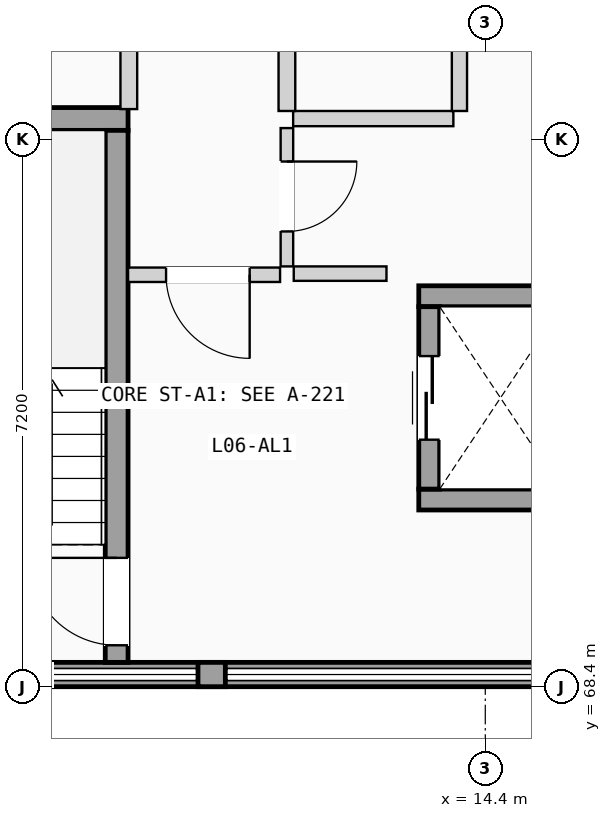
"""IFC4 building model, lengths in metres.
Left out: names, types, materials, properties, quantities, classifications, styles, units other than length and angle.
Written with IfcOpenShell. Run it as: python <this file> out.ifc"""

import sys

from ifc_helpers import new_model, si_unit, direction, frame, frame_2d, origin, place, context, subcontext, project, spatial, rectangle, extrude, element, fill, save


model = new_model("IFC4")
c1 = context("Model", 3, precision=1e-05, world=origin(), true_north=direction((0.0, 1.0)))
c2 = subcontext(c1, "Body", "Model", "MODEL_VIEW")
j1 = project(units=[si_unit("LENGTHUNIT", "METRE"), si_unit("PLANEANGLEUNIT", "RADIAN")], contexts=[c1])
p1 = place(None, origin())
s1 = spatial("IfcSite", under=j1, at=p1, CompositionType="ELEMENT")
p2 = place(p1, origin())
s2 = spatial("IfcBuilding", under=s1, at=p2, CompositionType="ELEMENT")
p3 = place(p2, frame((0.0, 0.0, 21.525)))
s3 = spatial("IfcBuildingStorey", under=s2, at=p3, CompositionType="ELEMENT", Elevation=21.525)
p4 = place(p3, frame((0.0, 68.56, 0.0), z_axis=(0.0, 0.0, 1.0), x_axis=(1.0, 0.0, 0.0)))
e1 = element("IfcWall", 1, at=p4, inside=s3, PredefinedType="SOLIDWALL", context=c2, shape_type="SweptSolid", body=[
    extrude(rectangle(XDim=21.6, YDim=0.32, at=frame_2d((10.8, 0.0))), origin(), (0.0, 0.0, 1.0), 1.11),
])
p5 = place(p3, frame((10.62, 68.56, 1.11), z_axis=(0.0, 0.0, 1.0), x_axis=(1.0, 0.0, 0.0)))
e2 = element("IfcWall", 2, at=p5, inside=s3, PredefinedType="SOLIDWALL", context=c2, shape_type="SweptSolid", body=[
    extrude(rectangle(XDim=0.36, YDim=0.32, at=frame_2d((0.18, 0.0))), origin(), (0.0, 0.0, 1.0), 1.78),
])
p6 = place(p3, frame((5.7, 75.87, 0.0), z_axis=(0.0, 0.0, 1.0), x_axis=(1.0, 0.0, 0.0)))
e3 = element("IfcWall", 3, at=p6, inside=s3, PredefinedType="SHEAR", context=c2, shape_type="SweptSolid", body=[
    extrude(rectangle(XDim=4.0, YDim=0.3, at=frame_2d((2.0, 0.0))), origin(), (0.0, 0.0, 1.0), 2.89),
])
p7 = place(p3, frame((9.55, 68.72, 0.0), z_axis=(0.0, 0.0, 1.0), x_axis=(0.0, 1.0, 0.0)))
e4 = element("IfcWall", 4, at=p7, inside=s3, PredefinedType="SHEAR", context=c2, shape_type="SweptSolid", body=[
    extrude(rectangle(XDim=7.0, YDim=0.3, at=frame_2d((3.5, 0.0))), origin(), (0.0, 0.0, 1.0), 2.89),
])
p8 = place(p7, frame((0.225, 0.0, 0.0)))
e5 = element("IfcOpeningElement", 5, at=p8, cuts=e4, PredefinedType="OPENING", context=c2, shape_type="SweptSolid", body=[
    extrude(rectangle(XDim=1.15, YDim=2.12, at=frame_2d((0.575, 1.06))), frame((0.0, 0.16, 0.0), z_axis=(0.0, -1.0, 0.0), x_axis=(1.0, 0.0, 0.0)), (0.0, 0.0, 1.0), 0.32),
])
for number, where, z_axis, x_axis in (
    (6, (13.525, 70.863, 0.0), (0.0, 0.0, 1.0), (1.0, 0.0, 0.0)),
    (7, (13.525, 73.538, 0.0), (0.0, 0.0, 1.0), (1.0, 0.0, 0.0)),
):
    element("IfcWall", number, at=place(p3, frame(where, z_axis=z_axis, x_axis=x_axis)), inside=s3, PredefinedType="SHEAR", context=c2, shape_type="SweptSolid", body=[
        extrude(rectangle(XDim=2.15, YDim=0.275, at=frame_2d((1.075, 0.0))), origin(), (0.0, 0.0, 1.0), 2.89),
    ])
p9 = place(p3, frame((13.663, 71.0, 0.0), z_axis=(0.0, 0.0, 1.0), x_axis=(0.0, 1.0, 0.0)))
e8 = element("IfcWall", 8, at=p9, inside=s3, PredefinedType="SHEAR", context=c2, shape_type="SweptSolid", body=[
    extrude(rectangle(XDim=2.4, YDim=0.275, at=frame_2d((1.2, 0.0))), origin(), (0.0, 0.0, 1.0), 2.89),
])
p10 = place(p9, frame((0.65, 0.0, 0.0)))
e9 = element("IfcOpeningElement", 9, at=p10, cuts=e8, PredefinedType="OPENING", context=c2, shape_type="SweptSolid", body=[
    extrude(rectangle(XDim=1.1, YDim=2.15, at=frame_2d((0.55, 1.075))), frame((0.0, 0.147, 0.0), z_axis=(0.0, -1.0, 0.0), x_axis=(1.0, 0.0, 0.0)), (0.0, 0.0, 1.0), 0.295),
])
p11 = place(p3, frame((11.88, 73.835, 0.0), z_axis=(0.0, 0.0, 1.0), x_axis=(1.0, 0.0, 0.0)))
e10 = element("IfcWall", 10, at=p11, inside=s3, PredefinedType="PARTITIONING", context=c2, shape_type="SweptSolid", body=[
    extrude(rectangle(XDim=1.22, YDim=0.19, at=frame_2d((0.61, 0.0))), origin(), (0.0, 0.0, 1.0), 2.87),
])
p12 = place(p3, frame((9.7, 73.82, 0.0), z_axis=(0.0, 0.0, 1.0), x_axis=(1.0, 0.0, 0.0)))
e11 = element("IfcWall", 11, at=p12, inside=s3, PredefinedType="PARTITIONING", context=c2, shape_type="SweptSolid", body=[
    extrude(rectangle(XDim=2.0, YDim=0.19, at=frame_2d((1.0, 0.0))), origin(), (0.0, 0.0, 1.0), 2.87),
])
p13 = place(p12, frame((0.5, 0.0, 0.0)))
e12 = element("IfcOpeningElement", 12, at=p13, cuts=e11, PredefinedType="OPENING", context=c2, shape_type="SweptSolid", body=[
    extrude(rectangle(XDim=1.1, YDim=2.12, at=frame_2d((0.55, 1.06))), frame((0.0, 0.105, 0.0), z_axis=(0.0, -1.0, 0.0), x_axis=(1.0, 0.0, 0.0)), (0.0, 0.0, 1.0), 0.21),
])
p14 = place(p3, frame((11.79, 73.93, 0.0), z_axis=(0.0, 0.0, 1.0), x_axis=(0.0, 1.0, 0.0)))
e13 = element("IfcWall", 13, at=p14, inside=s3, PredefinedType="PARTITIONING", context=c2, shape_type="SweptSolid", body=[
    extrude(rectangle(XDim=1.82, YDim=0.165, at=frame_2d((0.91, 0.0))), origin(), (0.0, 0.0, 1.0), 2.87),
])
p15 = place(p14, frame((0.46, 0.0, 0.0)))
e14 = element("IfcOpeningElement", 14, at=p15, cuts=e13, PredefinedType="OPENING", context=c2, shape_type="SweptSolid", body=[
    extrude(rectangle(XDim=0.92, YDim=2.04, at=frame_2d((0.46, 1.02))), frame((0.0, 0.093, 0.0), z_axis=(0.0, -1.0, 0.0), x_axis=(1.0, 0.0, 0.0)), (0.0, 0.0, 1.0), 0.185),
])
p16 = place(p3, frame((11.872, 75.875, 0.0), z_axis=(0.0, 0.0, 1.0), x_axis=(1.0, 0.0, 0.0)))
e15 = element("IfcWall", 15, at=p16, inside=s3, PredefinedType="PLUMBINGWALL", context=c2, shape_type="SweptSolid", body=[
    extrude(rectangle(XDim=2.108, YDim=0.2, at=frame_2d((1.054, 0.0))), origin(), (0.0, 0.0, 1.0), 2.87),
])
p17 = place(p3, frame((9.71, 76.0, 0.0), z_axis=(0.0, 0.0, 1.0), x_axis=(0.0, 1.0, 0.0)))
e16 = element("IfcWall", 16, at=p17, inside=s3, PredefinedType="PLUMBINGWALL", context=c2, shape_type="SweptSolid", body=[
    extrude(rectangle(XDim=4.039, YDim=0.22, at=frame_2d((2.02, 0.0))), origin(), (0.0, 0.0, 1.0), 2.87),
])
p18 = place(p3, frame((11.79, 75.975, 0.0), z_axis=(0.0, 0.0, 1.0), x_axis=(0.0, 1.0, 0.0)))
e17 = element("IfcWall", 17, at=p18, inside=s3, PredefinedType="PLUMBINGWALL", context=c2, shape_type="SweptSolid", body=[
    extrude(rectangle(XDim=4.064, YDim=0.22, at=frame_2d((2.032, 0.0))), origin(), (0.0, 0.0, 1.0), 2.87),
])
p19 = place(p3, frame((14.06, 75.975, 0.0), z_axis=(0.0, 0.0, 1.0), x_axis=(0.0, 1.0, 0.0)))
e18 = element("IfcWall", 18, at=p19, inside=s3, PredefinedType="PLUMBINGWALL", context=c2, shape_type="SweptSolid", body=[
    extrude(rectangle(XDim=4.064, YDim=0.2, at=frame_2d((2.032, 0.0))), origin(), (0.0, 0.0, 1.0), 2.87),
])
p20 = place(p8, origin())
e19 = element("IfcDoor", 19, at=p20, inside=s3, OperationType="SINGLE_SWING_RIGHT", PredefinedType="DOOR", context=c2, shape_type="SweptSolid", body=[
    extrude(rectangle(XDim=1.15, YDim=2.12, at=frame_2d((0.575, 1.06))), frame((0.0, 0.025, 0.0), z_axis=(0.0, -1.0, 0.0), x_axis=(1.0, 0.0, 0.0)), (0.0, 0.0, 1.0), 0.05),
])
fill(e5, e19)
p21 = place(p10, origin())
e20 = element("IfcDoor", 20, at=p21, inside=s3, OperationType="SLIDING_TO_LEFT", PredefinedType="DOOR", context=c2, shape_type="SweptSolid", body=[
    extrude(rectangle(XDim=1.1, YDim=2.15, at=frame_2d((0.55, 1.075))), frame((0.0, 0.025, 0.0), z_axis=(0.0, -1.0, 0.0), x_axis=(1.0, 0.0, 0.0)), (0.0, 0.0, 1.0), 0.05),
])
fill(e9, e20)
p22 = place(p13, frame((1.1, 0.0, 0.0), z_axis=(0.0, 0.0, 1.0), x_axis=(-1.0, 0.0, 0.0)))
e21 = element("IfcDoor", 21, at=p22, inside=s3, OperationType="SINGLE_SWING_RIGHT", PredefinedType="DOOR", context=c2, shape_type="SweptSolid", body=[
    extrude(rectangle(XDim=1.1, YDim=2.12, at=frame_2d((0.55, 1.06))), frame((0.0, 0.025, 0.0), z_axis=(0.0, -1.0, 0.0), x_axis=(1.0, 0.0, 0.0)), (0.0, 0.0, 1.0), 0.05),
])
fill(e12, e21)
p23 = place(p15, frame((0.92, 0.0, 0.0), z_axis=(0.0, 0.0, 1.0), x_axis=(-1.0, 0.0, 0.0)))
e22 = element("IfcDoor", 22, at=p23, inside=s3, OperationType="SINGLE_SWING_RIGHT", PredefinedType="DOOR", context=c2, shape_type="SweptSolid", body=[
    extrude(rectangle(XDim=0.92, YDim=2.04, at=frame_2d((0.46, 1.02))), frame((0.0, 0.025, 0.0), z_axis=(0.0, -1.0, 0.0), x_axis=(1.0, 0.0, 0.0)), (0.0, 0.0, 1.0), 0.05),
])
fill(e14, e22)
save(model, sys.argv[1])
